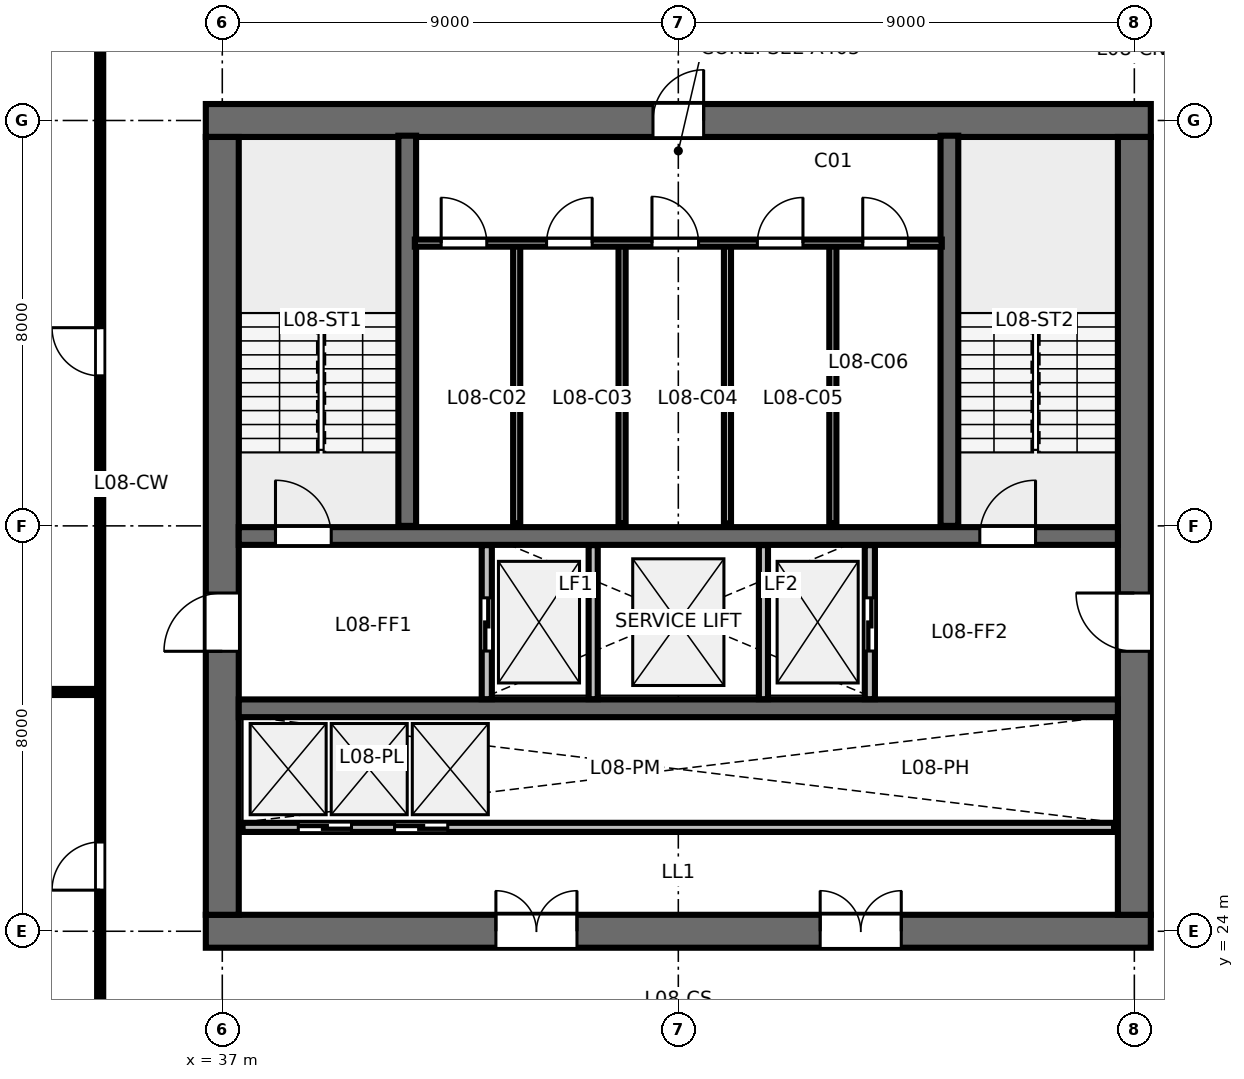
"""IFC4 building model, lengths in metres.
Left out: names, types, materials, properties, quantities, classifications, styles, units other than length and angle.
Written with IfcOpenShell. Run it as: python <this file> out.ifc"""

import sys

from ifc_helpers import new_model, si_unit, direction, frame, frame_2d, origin, place, context, subcontext, project, spatial, rectangle, extrude, element, fill, save


model = new_model("IFC4")
c1 = context("Model", 3, precision=1e-05, world=origin(), true_north=direction((0.0, 1.0)))
c2 = subcontext(c1, "Body", "Model", "MODEL_VIEW")
j1 = project(units=[si_unit("LENGTHUNIT", "METRE"), si_unit("PLANEANGLEUNIT", "RADIAN")], contexts=[c1])
p1 = place(None, origin())
s1 = spatial("IfcSite", under=j1, at=p1, CompositionType="ELEMENT")
p2 = place(p1, origin())
s2 = spatial("IfcBuilding", under=s1, at=p2, CompositionType="ELEMENT")
p3 = place(p2, frame((0.0, 0.0, 35.2)))
s3 = spatial("IfcBuildingStorey", under=s2, at=p3, CompositionType="ELEMENT", Elevation=35.2)
p4 = place(p3, frame((36.675, 24.0, 0.0), z_axis=(0.0, 0.0, 1.0), x_axis=(1.0, 0.0, 0.0)))
e1 = element("IfcWall", 1, at=p4, inside=s3, PredefinedType="SHEAR", context=c2, shape_type="SweptSolid", body=[
    extrude(rectangle(XDim=18.65, YDim=0.65, at=frame_2d((9.325, 0.0))), origin(), (0.0, 0.0, 1.0), 3.36),
])
p5 = place(p4, frame((5.725, 0.0, 0.0)))
e2 = element("IfcOpeningElement", 2, at=p5, cuts=e1, PredefinedType="OPENING", context=c2, shape_type="SweptSolid", body=[
    extrude(rectangle(XDim=1.6, YDim=2.15, at=frame_2d((0.8, 1.075))), frame((0.0, 0.335, 0.0), z_axis=(0.0, -1.0, 0.0), x_axis=(1.0, 0.0, 0.0)), (0.0, 0.0, 1.0), 0.67),
])
p6 = place(p4, frame((12.125, 0.0, 0.0)))
e3 = element("IfcOpeningElement", 3, at=p6, cuts=e1, PredefinedType="OPENING", context=c2, shape_type="SweptSolid", body=[
    extrude(rectangle(XDim=1.6, YDim=2.15, at=frame_2d((0.8, 1.075))), frame((0.0, 0.335, 0.0), z_axis=(0.0, -1.0, 0.0), x_axis=(1.0, 0.0, 0.0)), (0.0, 0.0, 1.0), 0.67),
])
p7 = place(p3, frame((36.675, 40.0, 0.0), z_axis=(0.0, 0.0, 1.0), x_axis=(1.0, 0.0, 0.0)))
e4 = element("IfcWall", 4, at=p7, inside=s3, PredefinedType="SHEAR", context=c2, shape_type="SweptSolid", body=[
    extrude(rectangle(XDim=18.65, YDim=0.65, at=frame_2d((9.325, 0.0))), origin(), (0.0, 0.0, 1.0), 3.36),
])
p8 = place(p7, frame((8.825, 0.0, 0.0)))
e5 = element("IfcOpeningElement", 5, at=p8, cuts=e4, PredefinedType="OPENING", context=c2, shape_type="SweptSolid", body=[
    extrude(rectangle(XDim=1.0, YDim=2.15, at=frame_2d((0.5, 1.075))), frame((0.0, 0.335, 0.0), z_axis=(0.0, -1.0, 0.0), x_axis=(1.0, 0.0, 0.0)), (0.0, 0.0, 1.0), 0.67),
])
p9 = place(p3, frame((37.0, 24.325, 0.0), z_axis=(0.0, 0.0, 1.0), x_axis=(0.0, 1.0, 0.0)))
e6 = element("IfcWall", 6, at=p9, inside=s3, PredefinedType="SHEAR", context=c2, shape_type="SweptSolid", body=[
    extrude(rectangle(XDim=15.35, YDim=0.65, at=frame_2d((7.675, 0.0))), origin(), (0.0, 0.0, 1.0), 3.36),
])
p10 = place(p9, frame((5.2, 0.0, 0.0)))
e7 = element("IfcOpeningElement", 7, at=p10, cuts=e6, PredefinedType="OPENING", context=c2, shape_type="SweptSolid", body=[
    extrude(rectangle(XDim=1.15, YDim=2.15, at=frame_2d((0.575, 1.075))), frame((0.0, 0.335, 0.0), z_axis=(0.0, -1.0, 0.0), x_axis=(1.0, 0.0, 0.0)), (0.0, 0.0, 1.0), 0.67),
])
p11 = place(p3, frame((55.0, 24.325, 0.0), z_axis=(0.0, 0.0, 1.0), x_axis=(0.0, 1.0, 0.0)))
e8 = element("IfcWall", 8, at=p11, inside=s3, PredefinedType="SHEAR", context=c2, shape_type="SweptSolid", body=[
    extrude(rectangle(XDim=15.35, YDim=0.65, at=frame_2d((7.675, 0.0))), origin(), (0.0, 0.0, 1.0), 3.36),
])
p12 = place(p11, frame((5.2, 0.0, 0.0)))
e9 = element("IfcOpeningElement", 9, at=p12, cuts=e8, PredefinedType="OPENING", context=c2, shape_type="SweptSolid", body=[
    extrude(rectangle(XDim=1.15, YDim=2.15, at=frame_2d((0.575, 1.075))), frame((0.0, 0.335, 0.0), z_axis=(0.0, -1.0, 0.0), x_axis=(1.0, 0.0, 0.0)), (0.0, 0.0, 1.0), 0.67),
])
p13 = place(p3, frame((37.325, 31.8, 0.0), z_axis=(0.0, 0.0, 1.0), x_axis=(1.0, 0.0, 0.0)))
e10 = element("IfcWall", 10, at=p13, inside=s3, PredefinedType="SHEAR", context=c2, shape_type="SweptSolid", body=[
    extrude(rectangle(XDim=17.35, YDim=0.35, at=frame_2d((8.675, 0.0))), origin(), (0.0, 0.0, 1.0), 3.36),
])
p14 = place(p13, frame((0.725, 0.0, 0.0)))
e11 = element("IfcOpeningElement", 11, at=p14, cuts=e10, PredefinedType="OPENING", context=c2, shape_type="SweptSolid", body=[
    extrude(rectangle(XDim=1.1, YDim=2.15, at=frame_2d((0.55, 1.075))), frame((0.0, 0.185, 0.0), z_axis=(0.0, -1.0, 0.0), x_axis=(1.0, 0.0, 0.0)), (0.0, 0.0, 1.0), 0.37),
])
p15 = place(p13, frame((14.625, 0.0, 0.0)))
e12 = element("IfcOpeningElement", 12, at=p15, cuts=e10, PredefinedType="OPENING", context=c2, shape_type="SweptSolid", body=[
    extrude(rectangle(XDim=1.1, YDim=2.15, at=frame_2d((0.55, 1.075))), frame((0.0, 0.185, 0.0), z_axis=(0.0, -1.0, 0.0), x_axis=(1.0, 0.0, 0.0)), (0.0, 0.0, 1.0), 0.37),
])
p16 = place(p3, frame((37.325, 28.4, 0.0), z_axis=(0.0, 0.0, 1.0), x_axis=(1.0, 0.0, 0.0)))
e13 = element("IfcWall", 13, at=p16, inside=s3, PredefinedType="SHEAR", context=c2, shape_type="SweptSolid", body=[
    extrude(rectangle(XDim=17.35, YDim=0.35, at=frame_2d((8.675, 0.0))), origin(), (0.0, 0.0, 1.0), 3.36),
])
for number, where, z_axis, x_axis in (
    (14, (40.65, 32.0, 0.0), (0.0, 0.0, 1.0), (0.0, 1.0, 0.0)),
    (15, (51.35, 32.0, 0.0), (0.0, 0.0, 1.0), (0.0, 1.0, 0.0)),
):
    element("IfcWall", number, at=place(p3, frame(where, z_axis=z_axis, x_axis=x_axis)), inside=s3, PredefinedType="SHEAR", context=c2, shape_type="SweptSolid", body=[
        extrude(rectangle(XDim=7.7, YDim=0.35, at=frame_2d((3.85, 0.0))), origin(), (0.0, 0.0, 1.0), 3.6),
    ])
for number, where, z_axis, x_axis in (
    (16, (42.81, 32.05, 0.0), (0.0, 0.0, 1.0), (0.0, 1.0, 0.0)),
    (17, (44.89, 32.05, 0.0), (0.0, 0.0, 1.0), (0.0, 1.0, 0.0)),
    (18, (46.97, 32.05, 0.0), (0.0, 0.0, 1.0), (0.0, 1.0, 0.0)),
    (19, (49.05, 32.05, 0.0), (0.0, 0.0, 1.0), (0.0, 1.0, 0.0)),
):
    element("IfcWall", number, at=place(p3, frame(where, z_axis=z_axis, x_axis=x_axis)), inside=s3, PredefinedType="PARTITIONING", context=c2, shape_type="SweptSolid", body=[
        extrude(rectangle(XDim=5.5, YDim=0.14, at=frame_2d((2.75, 0.0))), origin(), (0.0, 0.0, 1.0), 3.15),
    ])
p17 = place(p3, frame((40.8, 37.58, 0.0), z_axis=(0.0, 0.0, 1.0), x_axis=(1.0, 0.0, 0.0)))
e20 = element("IfcWall", 20, at=p17, inside=s3, PredefinedType="PARTITIONING", context=c2, shape_type="SweptSolid", body=[
    extrude(rectangle(XDim=10.4, YDim=0.14, at=frame_2d((5.2, 0.0))), origin(), (0.0, 0.0, 1.0), 3.15),
])
p18 = place(p17, frame((0.52, 0.0, 0.0)))
e21 = element("IfcOpeningElement", 21, at=p18, cuts=e20, PredefinedType="OPENING", context=c2, shape_type="SweptSolid", body=[
    extrude(rectangle(XDim=0.9, YDim=2.15, at=frame_2d((0.45, 1.075))), frame((0.0, 0.08, 0.0), z_axis=(0.0, -1.0, 0.0), x_axis=(1.0, 0.0, 0.0)), (0.0, 0.0, 1.0), 0.16),
])
p19 = place(p17, frame((2.6, 0.0, 0.0)))
e22 = element("IfcOpeningElement", 22, at=p19, cuts=e20, PredefinedType="OPENING", context=c2, shape_type="SweptSolid", body=[
    extrude(rectangle(XDim=0.9, YDim=2.15, at=frame_2d((0.45, 1.075))), frame((0.0, 0.08, 0.0), z_axis=(0.0, -1.0, 0.0), x_axis=(1.0, 0.0, 0.0)), (0.0, 0.0, 1.0), 0.16),
])
p20 = place(p17, frame((4.68, 0.0, 0.0)))
e23 = element("IfcOpeningElement", 23, at=p20, cuts=e20, PredefinedType="OPENING", context=c2, shape_type="SweptSolid", body=[
    extrude(rectangle(XDim=0.92, YDim=2.15, at=frame_2d((0.46, 1.075))), frame((0.0, 0.08, 0.0), z_axis=(0.0, -1.0, 0.0), x_axis=(1.0, 0.0, 0.0)), (0.0, 0.0, 1.0), 0.16),
])
p21 = place(p17, frame((6.76, 0.0, 0.0)))
e24 = element("IfcOpeningElement", 24, at=p21, cuts=e20, PredefinedType="OPENING", context=c2, shape_type="SweptSolid", body=[
    extrude(rectangle(XDim=0.9, YDim=2.15, at=frame_2d((0.45, 1.075))), frame((0.0, 0.08, 0.0), z_axis=(0.0, -1.0, 0.0), x_axis=(1.0, 0.0, 0.0)), (0.0, 0.0, 1.0), 0.16),
])
p22 = place(p17, frame((8.84, 0.0, 0.0)))
e25 = element("IfcOpeningElement", 25, at=p22, cuts=e20, PredefinedType="OPENING", context=c2, shape_type="SweptSolid", body=[
    extrude(rectangle(XDim=0.9, YDim=2.15, at=frame_2d((0.45, 1.075))), frame((0.0, 0.08, 0.0), z_axis=(0.0, -1.0, 0.0), x_axis=(1.0, 0.0, 0.0)), (0.0, 0.0, 1.0), 0.16),
])
p23 = place(p3, frame((42.22, 28.58, 0.0), z_axis=(0.0, 0.0, 1.0), x_axis=(0.0, 1.0, 0.0)))
e26 = element("IfcWall", 26, at=p23, inside=s3, PredefinedType="PARTITIONING", context=c2, shape_type="SweptSolid", body=[
    extrude(rectangle(XDim=3.04, YDim=0.2, at=frame_2d((1.52, 0.0))), origin(), (0.0, 0.0, 1.0), 3.15),
])
p24 = place(p23, frame((0.95, 0.0, 0.0)))
e27 = element("IfcOpeningElement", 27, at=p24, cuts=e26, PredefinedType="OPENING", context=c2, shape_type="SweptSolid", body=[
    extrude(rectangle(XDim=1.05, YDim=2.15, at=frame_2d((0.525, 1.075))), frame((0.0, 0.11, 0.0), z_axis=(0.0, -1.0, 0.0), x_axis=(1.0, 0.0, 0.0)), (0.0, 0.0, 1.0), 0.22),
])
p25 = place(p3, frame((49.78, 28.58, 0.0), z_axis=(0.0, 0.0, 1.0), x_axis=(0.0, 1.0, 0.0)))
e28 = element("IfcWall", 28, at=p25, inside=s3, PredefinedType="PARTITIONING", context=c2, shape_type="SweptSolid", body=[
    extrude(rectangle(XDim=3.04, YDim=0.2, at=frame_2d((1.52, 0.0))), origin(), (0.0, 0.0, 1.0), 3.15),
])
p26 = place(p25, frame((0.95, 0.0, 0.0)))
e29 = element("IfcOpeningElement", 29, at=p26, cuts=e28, PredefinedType="OPENING", context=c2, shape_type="SweptSolid", body=[
    extrude(rectangle(XDim=1.05, YDim=2.15, at=frame_2d((0.525, 1.075))), frame((0.0, 0.11, 0.0), z_axis=(0.0, -1.0, 0.0), x_axis=(1.0, 0.0, 0.0)), (0.0, 0.0, 1.0), 0.22),
])
for number, where, z_axis, x_axis in (
    (30, (44.32, 28.58, 0.0), (0.0, 0.0, 1.0), (0.0, 1.0, 0.0)),
    (31, (47.68, 28.58, 0.0), (0.0, 0.0, 1.0), (0.0, 1.0, 0.0)),
):
    element("IfcWall", number, at=place(p3, frame(where, z_axis=z_axis, x_axis=x_axis)), inside=s3, PredefinedType="PARTITIONING", context=c2, shape_type="SweptSolid", body=[
        extrude(rectangle(XDim=3.04, YDim=0.18, at=frame_2d((1.52, 0.0))), origin(), (0.0, 0.0, 1.0), 3.15),
    ])
p27 = place(p3, frame((37.4, 26.05, 0.0), z_axis=(0.0, 0.0, 1.0), x_axis=(1.0, 0.0, 0.0)))
e32 = element("IfcWall", 32, at=p27, inside=s3, PredefinedType="PARTITIONING", context=c2, shape_type="SweptSolid", body=[
    extrude(rectangle(XDim=17.2, YDim=0.18, at=frame_2d((8.6, 0.0))), origin(), (0.0, 0.0, 1.0), 3.15),
])
p28 = place(p27, frame((1.1, 0.0, 0.0)))
e33 = element("IfcOpeningElement", 33, at=p28, cuts=e32, PredefinedType="OPENING", context=c2, shape_type="SweptSolid", body=[
    extrude(rectangle(XDim=1.05, YDim=2.15, at=frame_2d((0.525, 1.075))), frame((0.0, 0.1, 0.0), z_axis=(0.0, -1.0, 0.0), x_axis=(1.0, 0.0, 0.0)), (0.0, 0.0, 1.0), 0.2),
])
p29 = place(p27, frame((3.0, 0.0, 0.0)))
e34 = element("IfcOpeningElement", 34, at=p29, cuts=e32, PredefinedType="OPENING", context=c2, shape_type="SweptSolid", body=[
    extrude(rectangle(XDim=1.05, YDim=2.15, at=frame_2d((0.525, 1.075))), frame((0.0, 0.1, 0.0), z_axis=(0.0, -1.0, 0.0), x_axis=(1.0, 0.0, 0.0)), (0.0, 0.0, 1.0), 0.2),
])
p30 = place(p3, frame((34.59, 28.722, 0.0), z_axis=(0.0, 0.0, 1.0), x_axis=(-1.0, 0.0, 0.0)))
e35 = element("IfcWall", 35, at=p30, inside=s3, PredefinedType="PARTITIONING", context=c2, shape_type="SweptSolid", body=[
    extrude(rectangle(XDim=12.01, YDim=0.12, at=frame_2d((6.005, 0.0))), origin(), (0.0, 0.0, 1.0), 2.43),
])
p31 = place(p30, frame((1.4, 0.0, 0.0)))
e36 = element("IfcOpeningElement", 36, at=p31, cuts=e35, PredefinedType="OPENING", context=c2, shape_type="SweptSolid", body=[
    extrude(rectangle(XDim=0.9, YDim=2.15, at=frame_2d((0.45, 1.075))), frame((0.0, 0.07, 0.0), z_axis=(0.0, -1.0, 0.0), x_axis=(1.0, 0.0, 0.0)), (0.0, 0.0, 1.0), 0.14),
])
p32 = place(p3, frame((34.59, 21.65, 0.0), z_axis=(0.0, 0.0, 1.0), x_axis=(0.0, 1.0, 0.0)))
e37 = element("IfcWall", 37, at=p32, inside=s3, PredefinedType="PARTITIONING", context=c2, shape_type="SweptSolid", body=[
    extrude(rectangle(XDim=20.7, YDim=0.12, at=frame_2d((10.35, 0.0))), origin(), (0.0, 0.0, 1.0), 2.43),
])
p33 = place(p32, frame((3.161, 0.0, 0.0)))
e38 = element("IfcOpeningElement", 38, at=p33, cuts=e37, PredefinedType="OPENING", context=c2, shape_type="SweptSolid", body=[
    extrude(rectangle(XDim=0.95, YDim=2.15, at=frame_2d((0.475, 1.075))), frame((0.0, 0.07, 0.0), z_axis=(0.0, -1.0, 0.0), x_axis=(1.0, 0.0, 0.0)), (0.0, 0.0, 1.0), 0.14),
])
p34 = place(p32, frame((13.311, 0.0, 0.0)))
e39 = element("IfcOpeningElement", 39, at=p34, cuts=e37, PredefinedType="OPENING", context=c2, shape_type="SweptSolid", body=[
    extrude(rectangle(XDim=0.95, YDim=2.15, at=frame_2d((0.475, 1.075))), frame((0.0, 0.07, 0.0), z_axis=(0.0, -1.0, 0.0), x_axis=(1.0, 0.0, 0.0)), (0.0, 0.0, 1.0), 0.14),
])
p35 = place(p14, origin())
e40 = element("IfcDoor", 40, at=p35, inside=s3, OperationType="SINGLE_SWING_LEFT", PredefinedType="DOOR", context=c2, shape_type="SweptSolid", body=[
    extrude(rectangle(XDim=1.1, YDim=2.15, at=frame_2d((0.55, 1.075))), frame((0.0, 0.025, 0.0), z_axis=(0.0, -1.0, 0.0), x_axis=(1.0, 0.0, 0.0)), (0.0, 0.0, 1.0), 0.05),
])
fill(e11, e40)
p36 = place(p15, origin())
e41 = element("IfcDoor", 41, at=p36, inside=s3, OperationType="SINGLE_SWING_RIGHT", PredefinedType="DOOR", context=c2, shape_type="SweptSolid", body=[
    extrude(rectangle(XDim=1.1, YDim=2.15, at=frame_2d((0.55, 1.075))), frame((0.0, 0.025, 0.0), z_axis=(0.0, -1.0, 0.0), x_axis=(1.0, 0.0, 0.0)), (0.0, 0.0, 1.0), 0.05),
])
fill(e12, e41)
p37 = place(p8, origin())
e42 = element("IfcDoor", 42, at=p37, inside=s3, OperationType="SINGLE_SWING_RIGHT", PredefinedType="DOOR", context=c2, shape_type="SweptSolid", body=[
    extrude(rectangle(XDim=1.0, YDim=2.15, at=frame_2d((0.5, 1.075))), frame((0.0, 0.025, 0.0), z_axis=(0.0, -1.0, 0.0), x_axis=(1.0, 0.0, 0.0)), (0.0, 0.0, 1.0), 0.05),
])
fill(e5, e42)
p38 = place(p10, origin())
e43 = element("IfcDoor", 43, at=p38, inside=s3, OperationType="SINGLE_SWING_LEFT", PredefinedType="DOOR", context=c2, shape_type="SweptSolid", body=[
    extrude(rectangle(XDim=1.15, YDim=2.15, at=frame_2d((0.575, 1.075))), frame((0.0, 0.025, 0.0), z_axis=(0.0, -1.0, 0.0), x_axis=(1.0, 0.0, 0.0)), (0.0, 0.0, 1.0), 0.05),
])
fill(e7, e43)
p39 = place(p12, origin())
e44 = element("IfcDoor", 44, at=p39, inside=s3, OperationType="SINGLE_SWING_RIGHT", PredefinedType="DOOR", context=c2, shape_type="SweptSolid", body=[
    extrude(rectangle(XDim=1.15, YDim=2.15, at=frame_2d((0.575, 1.075))), frame((0.0, 0.025, 0.0), z_axis=(0.0, -1.0, 0.0), x_axis=(1.0, 0.0, 0.0)), (0.0, 0.0, 1.0), 0.05),
])
fill(e9, e44)
p40 = place(p5, origin())
e45 = element("IfcDoor", 45, at=p40, inside=s3, OperationType="DOUBLE_DOOR_SINGLE_SWING", PredefinedType="DOOR", context=c2, shape_type="SweptSolid", body=[
    extrude(rectangle(XDim=1.6, YDim=2.15, at=frame_2d((0.8, 1.075))), frame((0.0, 0.025, 0.0), z_axis=(0.0, -1.0, 0.0), x_axis=(1.0, 0.0, 0.0)), (0.0, 0.0, 1.0), 0.05),
])
fill(e2, e45)
p41 = place(p6, origin())
e46 = element("IfcDoor", 46, at=p41, inside=s3, OperationType="DOUBLE_DOOR_SINGLE_SWING", PredefinedType="DOOR", context=c2, shape_type="SweptSolid", body=[
    extrude(rectangle(XDim=1.6, YDim=2.15, at=frame_2d((0.8, 1.075))), frame((0.0, 0.025, 0.0), z_axis=(0.0, -1.0, 0.0), x_axis=(1.0, 0.0, 0.0)), (0.0, 0.0, 1.0), 0.05),
])
fill(e3, e46)
p42 = place(p18, origin())
e47 = element("IfcDoor", 47, at=p42, inside=s3, OperationType="SINGLE_SWING_LEFT", PredefinedType="DOOR", context=c2, shape_type="SweptSolid", body=[
    extrude(rectangle(XDim=0.9, YDim=2.15, at=frame_2d((0.45, 1.075))), frame((0.0, 0.025, 0.0), z_axis=(0.0, -1.0, 0.0), x_axis=(1.0, 0.0, 0.0)), (0.0, 0.0, 1.0), 0.05),
])
fill(e21, e47)
p43 = place(p19, origin())
e48 = element("IfcDoor", 48, at=p43, inside=s3, OperationType="SINGLE_SWING_RIGHT", PredefinedType="DOOR", context=c2, shape_type="SweptSolid", body=[
    extrude(rectangle(XDim=0.9, YDim=2.15, at=frame_2d((0.45, 1.075))), frame((0.0, 0.025, 0.0), z_axis=(0.0, -1.0, 0.0), x_axis=(1.0, 0.0, 0.0)), (0.0, 0.0, 1.0), 0.05),
])
fill(e22, e48)
p44 = place(p20, origin())
e49 = element("IfcDoor", 49, at=p44, inside=s3, OperationType="SINGLE_SWING_LEFT", PredefinedType="DOOR", context=c2, shape_type="SweptSolid", body=[
    extrude(rectangle(XDim=0.92, YDim=2.15, at=frame_2d((0.46, 1.075))), frame((0.0, 0.025, 0.0), z_axis=(0.0, -1.0, 0.0), x_axis=(1.0, 0.0, 0.0)), (0.0, 0.0, 1.0), 0.05),
])
fill(e23, e49)
p45 = place(p21, origin())
e50 = element("IfcDoor", 50, at=p45, inside=s3, OperationType="SINGLE_SWING_RIGHT", PredefinedType="DOOR", context=c2, shape_type="SweptSolid", body=[
    extrude(rectangle(XDim=0.9, YDim=2.15, at=frame_2d((0.45, 1.075))), frame((0.0, 0.025, 0.0), z_axis=(0.0, -1.0, 0.0), x_axis=(1.0, 0.0, 0.0)), (0.0, 0.0, 1.0), 0.05),
])
fill(e24, e50)
p46 = place(p22, origin())
e51 = element("IfcDoor", 51, at=p46, inside=s3, OperationType="SINGLE_SWING_LEFT", PredefinedType="DOOR", context=c2, shape_type="SweptSolid", body=[
    extrude(rectangle(XDim=0.9, YDim=2.15, at=frame_2d((0.45, 1.075))), frame((0.0, 0.025, 0.0), z_axis=(0.0, -1.0, 0.0), x_axis=(1.0, 0.0, 0.0)), (0.0, 0.0, 1.0), 0.05),
])
fill(e25, e51)
p47 = place(p24, origin())
e52 = element("IfcDoor", 52, at=p47, inside=s3, OperationType="SLIDING_TO_LEFT", PredefinedType="DOOR", context=c2, shape_type="SweptSolid", body=[
    extrude(rectangle(XDim=1.05, YDim=2.15, at=frame_2d((0.525, 1.075))), frame((0.0, 0.025, 0.0), z_axis=(0.0, -1.0, 0.0), x_axis=(1.0, 0.0, 0.0)), (0.0, 0.0, 1.0), 0.05),
])
fill(e27, e52)
p48 = place(p26, origin())
e53 = element("IfcDoor", 53, at=p48, inside=s3, OperationType="SLIDING_TO_RIGHT", PredefinedType="DOOR", context=c2, shape_type="SweptSolid", body=[
    extrude(rectangle(XDim=1.05, YDim=2.15, at=frame_2d((0.525, 1.075))), frame((0.0, 0.025, 0.0), z_axis=(0.0, -1.0, 0.0), x_axis=(1.0, 0.0, 0.0)), (0.0, 0.0, 1.0), 0.05),
])
fill(e29, e53)
p49 = place(p28, origin())
e54 = element("IfcDoor", 54, at=p49, inside=s3, OperationType="SLIDING_TO_LEFT", PredefinedType="DOOR", context=c2, shape_type="SweptSolid", body=[
    extrude(rectangle(XDim=1.05, YDim=2.15, at=frame_2d((0.525, 1.075))), frame((0.0, 0.025, 0.0), z_axis=(0.0, -1.0, 0.0), x_axis=(1.0, 0.0, 0.0)), (0.0, 0.0, 1.0), 0.05),
])
fill(e33, e54)
p50 = place(p29, origin())
e55 = element("IfcDoor", 55, at=p50, inside=s3, OperationType="SLIDING_TO_RIGHT", PredefinedType="DOOR", context=c2, shape_type="SweptSolid", body=[
    extrude(rectangle(XDim=1.05, YDim=2.15, at=frame_2d((0.525, 1.075))), frame((0.0, 0.025, 0.0), z_axis=(0.0, -1.0, 0.0), x_axis=(1.0, 0.0, 0.0)), (0.0, 0.0, 1.0), 0.05),
])
fill(e34, e55)
p51 = place(p33, origin())
e56 = element("IfcDoor", 56, at=p51, inside=s3, OperationType="SINGLE_SWING_LEFT", PredefinedType="DOOR", context=c2, shape_type="SweptSolid", body=[
    extrude(rectangle(XDim=0.95, YDim=2.15, at=frame_2d((0.475, 1.075))), frame((0.0, 0.025, 0.0), z_axis=(0.0, -1.0, 0.0), x_axis=(1.0, 0.0, 0.0)), (0.0, 0.0, 1.0), 0.05),
])
fill(e38, e56)
p52 = place(p34, origin())
e57 = element("IfcDoor", 57, at=p52, inside=s3, OperationType="SINGLE_SWING_RIGHT", PredefinedType="DOOR", context=c2, shape_type="SweptSolid", body=[
    extrude(rectangle(XDim=0.95, YDim=2.15, at=frame_2d((0.475, 1.075))), frame((0.0, 0.025, 0.0), z_axis=(0.0, -1.0, 0.0), x_axis=(1.0, 0.0, 0.0)), (0.0, 0.0, 1.0), 0.05),
])
fill(e39, e57)
save(model, sys.argv[1])
